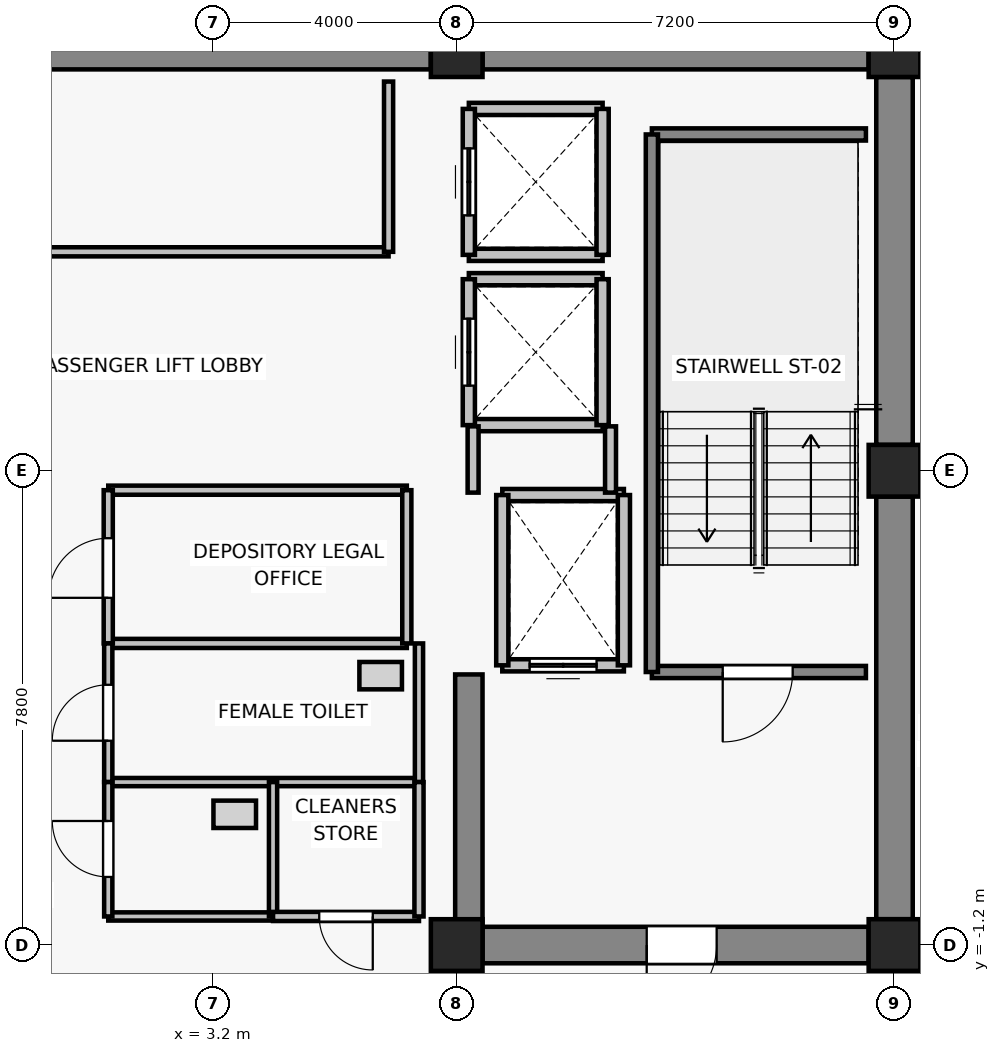
"""IFC4 building model, lengths in metres.
Left out: names, types, materials, properties, quantities, classifications, styles, units other than length and angle.
Written with IfcOpenShell. Run it as: python <this file> out.ifc"""

import sys

from ifc_helpers import new_model, si_unit, direction, frame, frame_2d, origin, origin_2d, place, context, subcontext, project, spatial, rectangle, extrude, source, transform, mapped, element, fill, save


model = new_model("IFC4")
c1 = context("Model", 3, precision=1e-05, world=origin(), true_north=direction((0.0, 1.0)))
c2 = subcontext(c1, "Body", "Model", "MODEL_VIEW")
j1 = project(units=[si_unit("LENGTHUNIT", "METRE"), si_unit("PLANEANGLEUNIT", "RADIAN")], contexts=[c1])
p1 = place(None, origin())
s1 = spatial("IfcSite", under=j1, at=p1, CompositionType="ELEMENT")
p2 = place(p1, origin())
s2 = spatial("IfcBuilding", under=s1, at=p2, CompositionType="ELEMENT")
p3 = place(p2, frame((0.0, 0.0, 205.6)))
s3 = spatial("IfcBuildingStorey", under=s2, at=p3, CompositionType="ELEMENT", Elevation=205.6)
for number, where, z_axis, x_axis in (
    (1, (7.2, -1.2, 0.0), (0.0, 0.0, 1.0), (1.0, 0.0, 0.0)),
    (2, (14.4, -1.2, 0.0), (0.0, 0.0, 1.0), (1.0, 0.0, 0.0)),
    (3, (14.4, 6.6, 0.0), (0.0, 0.0, 1.0), (1.0, 0.0, 0.0)),
    (4, (7.2, 13.5, 0.0), (0.0, 0.0, 1.0), (1.0, 0.0, 0.0)),
    (5, (14.4, 13.5, 0.0), (0.0, 0.0, 1.0), (1.0, 0.0, 0.0)),
):
    element("IfcColumn", number, at=place(p3, frame(where, z_axis=z_axis, x_axis=x_axis)), inside=s3, PredefinedType="COLUMN", context=c2, shape_type="SweptSolid", body=[
        extrude(rectangle(XDim=0.85, YDim=0.85, at=origin_2d()), origin(), (0.0, 0.0, 1.0), 3.3),
    ])
p4 = place(p3, frame((-6.775, 13.5, 0.0), z_axis=(0.0, 0.0, 1.0), x_axis=(1.0, 0.0, 0.0)))
e6 = element("IfcWall", 6, at=p4, inside=s3, PredefinedType="SHEAR", context=c2, shape_type="SweptSolid", body=[
    extrude(rectangle(XDim=13.55, YDim=0.6, at=frame_2d((6.775, 0.0))), origin(), (0.0, 0.0, 1.0), 3.075),
])
p5 = place(p3, frame((7.625, 13.5, 0.0), z_axis=(0.0, 0.0, 1.0), x_axis=(1.0, 0.0, 0.0)))
e7 = element("IfcWall", 7, at=p5, inside=s3, PredefinedType="SHEAR", context=c2, shape_type="SweptSolid", body=[
    extrude(rectangle(XDim=6.35, YDim=0.6, at=frame_2d((3.175, 0.0))), origin(), (0.0, 0.0, 1.0), 3.075),
])
p6 = place(p3, frame((14.4, -0.775, 0.0), z_axis=(0.0, 0.0, 1.0), x_axis=(0.0, 1.0, 0.0)))
e8 = element("IfcWall", 8, at=p6, inside=s3, PredefinedType="SHEAR", context=c2, shape_type="SweptSolid", body=[
    extrude(rectangle(XDim=6.95, YDim=0.6, at=frame_2d((3.475, 0.0))), origin(), (0.0, 0.0, 1.0), 3.075),
])
p7 = place(p3, frame((14.4, 7.025, 0.0), z_axis=(0.0, 0.0, 1.0), x_axis=(0.0, 1.0, 0.0)))
e9 = element("IfcWall", 9, at=p7, inside=s3, PredefinedType="SHEAR", context=c2, shape_type="SweptSolid", body=[
    extrude(rectangle(XDim=6.05, YDim=0.6, at=frame_2d((3.025, 0.0))), origin(), (0.0, 0.0, 1.0), 3.075),
])
p8 = place(p3, frame((13.975, -1.2, 0.0), z_axis=(0.0, 0.0, 1.0), x_axis=(-1.0, 0.0, 0.0)))
e10 = element("IfcWall", 10, at=p8, inside=s3, PredefinedType="SHEAR", context=c2, shape_type="SweptSolid", body=[
    extrude(rectangle(XDim=6.35, YDim=0.6, at=frame_2d((3.175, 0.0))), origin(), (0.0, 0.0, 1.0), 3.075),
])
p9 = place(p8, frame((2.5, 0.0, 0.0)))
e11 = element("IfcOpeningElement", 11, at=p9, cuts=e10, PredefinedType="OPENING", context=c2, shape_type="SweptSolid", body=[
    extrude(rectangle(XDim=1.15, YDim=2.15, at=frame_2d((0.575, 1.075))), frame((0.0, 0.31, 0.0), z_axis=(0.0, -1.0, 0.0), x_axis=(1.0, 0.0, 0.0)), (0.0, 0.0, 1.0), 0.62),
])
p10 = place(p3, frame((7.4, -0.9, 0.0), z_axis=(0.0, 0.0, 1.0), x_axis=(0.0, 1.0, 0.0)))
e12 = element("IfcWall", 12, at=p10, inside=s3, PredefinedType="SHEAR", context=c2, shape_type="SweptSolid", body=[
    extrude(rectangle(XDim=4.15, YDim=0.45, at=frame_2d((2.075, 0.0))), origin(), (0.0, 0.0, 1.0), 3.075),
])
p11 = place(p3, frame((9.95, 3.4, 0.0), z_axis=(0.0, 0.0, 1.0), x_axis=(-1.0, 0.0, 0.0)))
e13 = element("IfcWall", 13, at=p11, inside=s3, PredefinedType="SOLIDWALL", context=c2, shape_type="SweptSolid", body=[
    extrude(rectangle(XDim=2.0, YDim=0.2, at=frame_2d((1.0, 0.0))), origin(), (0.0, 0.0, 1.0), 3.075),
])
p12 = place(p11, frame((0.45, 0.0, 0.0)))
e14 = element("IfcOpeningElement", 14, at=p12, cuts=e13, PredefinedType="OPENING", context=c2, shape_type="SweptSolid", body=[
    extrude(rectangle(XDim=1.1, YDim=2.2, at=frame_2d((0.55, 1.1))), frame((0.0, 0.11, 0.0), z_axis=(0.0, -1.0, 0.0), x_axis=(1.0, 0.0, 0.0)), (0.0, 0.0, 1.0), 0.22),
])
p13 = place(p3, frame((7.95, 6.2, 0.0), z_axis=(0.0, 0.0, 1.0), x_axis=(1.0, 0.0, 0.0)))
e15 = element("IfcWall", 15, at=p13, inside=s3, PredefinedType="SOLIDWALL", context=c2, shape_type="SweptSolid", body=[
    extrude(rectangle(XDim=2.0, YDim=0.2, at=frame_2d((1.0, 0.0))), origin(), (0.0, 0.0, 1.0), 3.075),
])
for number, where, z_axis, x_axis in (
    (16, (7.95, 3.4, 0.0), (0.0, 0.0, 1.0), (0.0, 1.0, 0.0)),
    (17, (9.95, 6.2, 0.0), (0.0, 0.0, 1.0), (0.0, -1.0, 0.0)),
):
    element("IfcWall", number, at=place(p3, frame(where, z_axis=z_axis, x_axis=x_axis)), inside=s3, PredefinedType="SOLIDWALL", context=c2, shape_type="SweptSolid", body=[
        extrude(rectangle(XDim=2.8, YDim=0.2, at=frame_2d((1.4, 0.0))), origin(), (0.0, 0.0, 1.0), 3.075),
    ])
for number, where, z_axis, x_axis in (
    (18, (9.6, 7.35, 0.0), (0.0, 0.0, 1.0), (-1.0, 0.0, 0.0)),
    (19, (7.4, 9.75, 0.0), (0.0, 0.0, 1.0), (1.0, 0.0, 0.0)),
):
    element("IfcWall", number, at=place(p3, frame(where, z_axis=z_axis, x_axis=x_axis)), inside=s3, PredefinedType="SOLIDWALL", context=c2, shape_type="SweptSolid", body=[
        extrude(rectangle(XDim=2.2, YDim=0.2, at=frame_2d((1.1, 0.0))), origin(), (0.0, 0.0, 1.0), 2.615),
    ])
p14 = place(p3, frame((7.4, 7.35, 0.0), z_axis=(0.0, 0.0, 1.0), x_axis=(0.0, 1.0, 0.0)))
e20 = element("IfcWall", 20, at=p14, inside=s3, PredefinedType="SOLIDWALL", context=c2, shape_type="SweptSolid", body=[
    extrude(rectangle(XDim=2.4, YDim=0.2, at=frame_2d((1.2, 0.0))), origin(), (0.0, 0.0, 1.0), 2.615),
])
p15 = place(p14, frame((0.65, 0.0, 0.0)))
e21 = element("IfcOpeningElement", 21, at=p15, cuts=e20, PredefinedType="OPENING", context=c2, shape_type="SweptSolid", body=[
    extrude(rectangle(XDim=1.1, YDim=2.2, at=frame_2d((0.55, 1.1))), frame((0.0, 0.11, 0.0), z_axis=(0.0, -1.0, 0.0), x_axis=(1.0, 0.0, 0.0)), (0.0, 0.0, 1.0), 0.22),
])
p16 = place(p3, frame((9.6, 9.75, 0.0), z_axis=(0.0, 0.0, 1.0), x_axis=(0.0, -1.0, 0.0)))
e22 = element("IfcWall", 22, at=p16, inside=s3, PredefinedType="SOLIDWALL", context=c2, shape_type="SweptSolid", body=[
    extrude(rectangle(XDim=2.4, YDim=0.2, at=frame_2d((1.2, 0.0))), origin(), (0.0, 0.0, 1.0), 3.075),
])
for number, where, z_axis, x_axis in (
    (23, (9.6, 10.15, 0.0), (0.0, 0.0, 1.0), (-1.0, 0.0, 0.0)),
    (24, (7.4, 12.55, 0.0), (0.0, 0.0, 1.0), (1.0, 0.0, 0.0)),
):
    element("IfcWall", number, at=place(p3, frame(where, z_axis=z_axis, x_axis=x_axis)), inside=s3, PredefinedType="SOLIDWALL", context=c2, shape_type="SweptSolid", body=[
        extrude(rectangle(XDim=2.2, YDim=0.2, at=frame_2d((1.1, 0.0))), origin(), (0.0, 0.0, 1.0), 2.615),
    ])
p17 = place(p3, frame((7.4, 10.15, 0.0), z_axis=(0.0, 0.0, 1.0), x_axis=(0.0, 1.0, 0.0)))
e25 = element("IfcWall", 25, at=p17, inside=s3, PredefinedType="SOLIDWALL", context=c2, shape_type="SweptSolid", body=[
    extrude(rectangle(XDim=2.4, YDim=0.2, at=frame_2d((1.2, 0.0))), origin(), (0.0, 0.0, 1.0), 2.615),
])
p18 = place(p17, frame((0.65, 0.0, 0.0)))
e26 = element("IfcOpeningElement", 26, at=p18, cuts=e25, PredefinedType="OPENING", context=c2, shape_type="SweptSolid", body=[
    extrude(rectangle(XDim=1.1, YDim=2.2, at=frame_2d((0.55, 1.1))), frame((0.0, 0.11, 0.0), z_axis=(0.0, -1.0, 0.0), x_axis=(1.0, 0.0, 0.0)), (0.0, 0.0, 1.0), 0.22),
])
p19 = place(p3, frame((9.6, 12.55, 0.0), z_axis=(0.0, 0.0, 1.0), x_axis=(0.0, -1.0, 0.0)))
e27 = element("IfcWall", 27, at=p19, inside=s3, PredefinedType="SOLIDWALL", context=c2, shape_type="SweptSolid", body=[
    extrude(rectangle(XDim=2.4, YDim=0.2, at=frame_2d((1.2, 0.0))), origin(), (0.0, 0.0, 1.0), 3.075),
])
p20 = place(p3, frame((13.93, 3.29, 0.0), z_axis=(0.0, 0.0, 1.0), x_axis=(-1.0, 0.0, 0.0)))
e28 = element("IfcWall", 28, at=p20, inside=s3, PredefinedType="SOLIDWALL", context=c2, shape_type="SweptSolid", body=[
    extrude(rectangle(XDim=3.52, YDim=0.2, at=frame_2d((1.76, 0.0))), origin(), (0.0, 0.0, 1.0), 3.075),
])
p21 = place(p20, frame((1.205, 0.0, 0.0)))
e29 = element("IfcOpeningElement", 29, at=p21, cuts=e28, PredefinedType="OPENING", context=c2, shape_type="SweptSolid", body=[
    extrude(rectangle(XDim=1.15, YDim=2.15, at=frame_2d((0.575, 1.075))), frame((0.0, 0.11, 0.0), z_axis=(0.0, -1.0, 0.0), x_axis=(1.0, 0.0, 0.0)), (0.0, 0.0, 1.0), 0.22),
])
p22 = place(p3, frame((10.41, 12.13, 0.0), z_axis=(0.0, 0.0, 1.0), x_axis=(1.0, 0.0, 0.0)))
e30 = element("IfcWall", 30, at=p22, inside=s3, PredefinedType="SOLIDWALL", context=c2, shape_type="SweptSolid", body=[
    extrude(rectangle(XDim=3.52, YDim=0.2, at=frame_2d((1.76, 0.0))), origin(), (0.0, 0.0, 1.0), 3.075),
])
p23 = place(p3, frame((10.41, 3.29, 0.0), z_axis=(0.0, 0.0, 1.0), x_axis=(0.0, 1.0, 0.0)))
e31 = element("IfcWall", 31, at=p23, inside=s3, PredefinedType="SOLIDWALL", context=c2, shape_type="SweptSolid", body=[
    extrude(rectangle(XDim=8.84, YDim=0.2, at=frame_2d((4.42, 0.0))), origin(), (0.0, 0.0, 1.0), 3.075),
])
p24 = place(p3, frame((7.47, 6.24, 0.0), z_axis=(0.0, 0.0, 1.0), x_axis=(0.0, 1.0, 0.0)))
e32 = element("IfcWall", 32, at=p24, inside=s3, PredefinedType="PARTITIONING", context=c2, shape_type="SweptSolid", body=[
    extrude(rectangle(XDim=1.09, YDim=0.18, at=frame_2d((0.545, 0.0))), origin(), (0.0, 0.0, 1.0), 2.615),
])
p25 = place(p3, frame((9.73, 7.33, 0.0), z_axis=(0.0, 0.0, 1.0), x_axis=(0.0, -1.0, 0.0)))
e33 = element("IfcWall", 33, at=p25, inside=s3, PredefinedType="PARTITIONING", context=c2, shape_type="SweptSolid", body=[
    extrude(rectangle(XDim=1.09, YDim=0.18, at=frame_2d((0.545, 0.0))), origin(), (0.0, 0.0, 1.0), 3.075),
])
p26 = place(p3, frame((6.08, 10.2, 0.0), z_axis=(0.0, 0.0, 1.0), x_axis=(-1.0, 0.0, 0.0)))
e34 = element("IfcWall", 34, at=p26, inside=s3, PredefinedType="PARTITIONING", context=c2, shape_type="SweptSolid", body=[
    extrude(rectangle(XDim=12.16, YDim=0.15, at=frame_2d((6.08, 0.0))), origin(), (0.0, 0.0, 1.0), 2.59),
])
p27 = place(p26, frame((7.005, 0.0, 0.0)))
e35 = element("IfcOpeningElement", 35, at=p27, cuts=e34, PredefinedType="OPENING", context=c2, shape_type="SweptSolid", body=[
    extrude(rectangle(XDim=1.15, YDim=2.15, at=frame_2d((0.575, 1.075))), frame((0.0, 0.085, 0.0), z_axis=(0.0, -1.0, 0.0), x_axis=(1.0, 0.0, 0.0)), (0.0, 0.0, 1.0), 0.17),
])
p28 = place(p3, frame((6.08, 13.0, 0.0), z_axis=(0.0, 0.0, 1.0), x_axis=(0.0, -1.0, 0.0)))
e36 = element("IfcWall", 36, at=p28, inside=s3, PredefinedType="PARTITIONING", context=c2, shape_type="SweptSolid", body=[
    extrude(rectangle(XDim=2.8, YDim=0.15, at=frame_2d((1.4, 0.0))), origin(), (0.0, 0.0, 1.0), 3.075),
])
for number, where, z_axis, x_axis in (
    (37, (6.38, 3.76, 0.0), (0.0, 0.0, 1.0), (-1.0, 0.0, 0.0)),
    (38, (1.47, 6.28, 0.0), (0.0, 0.0, 1.0), (1.0, 0.0, 0.0)),
):
    element("IfcWall", number, at=place(p3, frame(where, z_axis=z_axis, x_axis=x_axis)), inside=s3, PredefinedType="PARTITIONING", context=c2, shape_type="SweptSolid", body=[
        extrude(rectangle(XDim=4.91, YDim=0.15, at=frame_2d((2.455, 0.0))), origin(), (0.0, 0.0, 1.0), 3.075),
    ])
p29 = place(p3, frame((1.47, 3.76, 0.0), z_axis=(0.0, 0.0, 1.0), x_axis=(0.0, 1.0, 0.0)))
e39 = element("IfcWall", 39, at=p29, inside=s3, PredefinedType="PARTITIONING", context=c2, shape_type="SweptSolid", body=[
    extrude(rectangle(XDim=2.52, YDim=0.15, at=frame_2d((1.26, 0.0))), origin(), (0.0, 0.0, 1.0), 3.075),
])
p30 = place(p29, frame((0.75, 0.0, 0.0)))
e40 = element("IfcOpeningElement", 40, at=p30, cuts=e39, PredefinedType="OPENING", context=c2, shape_type="SweptSolid", body=[
    extrude(rectangle(XDim=0.98, YDim=2.15, at=frame_2d((0.49, 1.075))), frame((0.0, 0.085, 0.0), z_axis=(0.0, -1.0, 0.0), x_axis=(1.0, 0.0, 0.0)), (0.0, 0.0, 1.0), 0.17),
])
p31 = place(p3, frame((6.38, 6.28, 0.0), z_axis=(0.0, 0.0, 1.0), x_axis=(0.0, -1.0, 0.0)))
e41 = element("IfcWall", 41, at=p31, inside=s3, PredefinedType="PARTITIONING", context=c2, shape_type="SweptSolid", body=[
    extrude(rectangle(XDim=2.52, YDim=0.15, at=frame_2d((1.26, 0.0))), origin(), (0.0, 0.0, 1.0), 3.075),
])
p32 = place(p3, frame((6.58, 1.48, 0.0), z_axis=(0.0, 0.0, 1.0), x_axis=(-1.0, 0.0, 0.0)))
e42 = element("IfcWall", 42, at=p32, inside=s3, PredefinedType="PARTITIONING", context=c2, shape_type="SweptSolid", body=[
    extrude(rectangle(XDim=5.11, YDim=0.135, at=frame_2d((2.555, 0.0))), origin(), (0.0, 0.0, 1.0), 3.075),
])
p33 = place(p3, frame((1.47, 1.48, 0.0), z_axis=(0.0, 0.0, 1.0), x_axis=(0.0, 1.0, 0.0)))
e43 = element("IfcWall", 43, at=p33, inside=s3, PredefinedType="PARTITIONING", context=c2, shape_type="SweptSolid", body=[
    extrude(rectangle(XDim=2.28, YDim=0.135, at=frame_2d((1.14, 0.0))), origin(), (0.0, 0.0, 1.0), 3.075),
])
p34 = place(p33, frame((0.68, 0.0, 0.0)))
e44 = element("IfcOpeningElement", 44, at=p34, cuts=e43, PredefinedType="OPENING", context=c2, shape_type="SweptSolid", body=[
    extrude(rectangle(XDim=0.92, YDim=2.1, at=frame_2d((0.46, 1.05))), frame((0.0, 0.077, 0.0), z_axis=(0.0, -1.0, 0.0), x_axis=(1.0, 0.0, 0.0)), (0.0, 0.0, 1.0), 0.155),
])
p35 = place(p3, frame((6.58, 3.76, 0.0), z_axis=(0.0, 0.0, 1.0), x_axis=(0.0, -1.0, 0.0)))
e45 = element("IfcWall", 45, at=p35, inside=s3, PredefinedType="PARTITIONING", context=c2, shape_type="SweptSolid", body=[
    extrude(rectangle(XDim=2.28, YDim=0.135, at=frame_2d((1.14, 0.0))), origin(), (0.0, 0.0, 1.0), 3.075),
])
p36 = place(p3, frame((4.18, -0.73, 0.0), z_axis=(0.0, 0.0, 1.0), x_axis=(-1.0, 0.0, 0.0)))
e46 = element("IfcWall", 46, at=p36, inside=s3, PredefinedType="PARTITIONING", context=c2, shape_type="SweptSolid", body=[
    extrude(rectangle(XDim=2.71, YDim=0.135, at=frame_2d((1.355, 0.0))), origin(), (0.0, 0.0, 1.0), 3.075),
])
p37 = place(p3, frame((1.47, -0.73, 0.0), z_axis=(0.0, 0.0, 1.0), x_axis=(0.0, 1.0, 0.0)))
e47 = element("IfcWall", 47, at=p37, inside=s3, PredefinedType="PARTITIONING", context=c2, shape_type="SweptSolid", body=[
    extrude(rectangle(XDim=2.21, YDim=0.135, at=frame_2d((1.105, 0.0))), origin(), (0.0, 0.0, 1.0), 3.075),
])
p38 = place(p37, frame((0.65, 0.0, 0.0)))
e48 = element("IfcOpeningElement", 48, at=p38, cuts=e47, PredefinedType="OPENING", context=c2, shape_type="SweptSolid", body=[
    extrude(rectangle(XDim=0.92, YDim=2.1, at=frame_2d((0.46, 1.05))), frame((0.0, 0.077, 0.0), z_axis=(0.0, -1.0, 0.0), x_axis=(1.0, 0.0, 0.0)), (0.0, 0.0, 1.0), 0.155),
])
p39 = place(p3, frame((4.18, 1.48, 0.0), z_axis=(0.0, 0.0, 1.0), x_axis=(0.0, -1.0, 0.0)))
e49 = element("IfcWall", 49, at=p39, inside=s3, PredefinedType="PARTITIONING", context=c2, shape_type="SweptSolid", body=[
    extrude(rectangle(XDim=2.21, YDim=0.135, at=frame_2d((1.105, 0.0))), origin(), (0.0, 0.0, 1.0), 3.075),
])
p40 = place(p3, frame((6.58, -0.73, 0.0), z_axis=(0.0, 0.0, 1.0), x_axis=(-1.0, 0.0, 0.0)))
e50 = element("IfcWall", 50, at=p40, inside=s3, PredefinedType="PARTITIONING", context=c2, shape_type="SweptSolid", body=[
    extrude(rectangle(XDim=2.4, YDim=0.15, at=frame_2d((1.2, 0.0))), origin(), (0.0, 0.0, 1.0), 3.075),
])
p41 = place(p40, frame((0.76, 0.0, 0.0)))
e51 = element("IfcOpeningElement", 51, at=p41, cuts=e50, PredefinedType="OPENING", context=c2, shape_type="SweptSolid", body=[
    extrude(rectangle(XDim=0.88, YDim=2.1, at=frame_2d((0.44, 1.05))), frame((0.0, 0.085, 0.0), z_axis=(0.0, -1.0, 0.0), x_axis=(1.0, 0.0, 0.0)), (0.0, 0.0, 1.0), 0.17),
])
p42 = place(p3, frame((6.58, 1.48, 0.0), z_axis=(0.0, 0.0, 1.0), x_axis=(0.0, -1.0, 0.0)))
e52 = element("IfcWall", 52, at=p42, inside=s3, PredefinedType="PARTITIONING", context=c2, shape_type="SweptSolid", body=[
    extrude(rectangle(XDim=2.21, YDim=0.15, at=frame_2d((1.105, 0.0))), origin(), (0.0, 0.0, 1.0), 3.075),
])
m1 = source(origin(), c2, "Body", "SweptSolid", [
    extrude(rectangle(XDim=1.1, YDim=2.2, at=frame_2d((0.55, 1.1))), frame((0.0, 0.025, 0.0), z_axis=(0.0, -1.0, 0.0), x_axis=(1.0, 0.0, 0.0)), (0.0, 0.0, 1.0), 0.05),
])
p43 = place(p12, origin())
e53 = element("IfcDoor", 53, at=p43, inside=s3, OperationType="DOUBLE_DOOR_SLIDING", PredefinedType="DOOR", context=c2, shape_type="MappedRepresentation", body=[
    mapped(m1, transform((0.0, 0.0, 0.0), x_axis=(1.0, 0.0, 0.0), y_axis=(0.0, 1.0, 0.0), z_axis=(0.0, 0.0, 1.0), scale=1.0)),
])
fill(e14, e53)
p44 = place(p15, origin())
e54 = element("IfcDoor", 54, at=p44, inside=s3, OperationType="DOUBLE_DOOR_SLIDING", PredefinedType="DOOR", context=c2, shape_type="MappedRepresentation", body=[
    mapped(m1, transform((0.0, 0.0, 0.0), x_axis=(1.0, 0.0, 0.0), y_axis=(0.0, 1.0, 0.0), z_axis=(0.0, 0.0, 1.0), scale=1.0)),
])
fill(e21, e54)
p45 = place(p18, origin())
e55 = element("IfcDoor", 55, at=p45, inside=s3, OperationType="DOUBLE_DOOR_SLIDING", PredefinedType="DOOR", context=c2, shape_type="MappedRepresentation", body=[
    mapped(m1, transform((0.0, 0.0, 0.0), x_axis=(1.0, 0.0, 0.0), y_axis=(0.0, 1.0, 0.0), z_axis=(0.0, 0.0, 1.0), scale=1.0)),
])
fill(e26, e55)
m2 = source(origin(), c2, "Body", "SweptSolid", [
    extrude(rectangle(XDim=1.15, YDim=2.15, at=frame_2d((0.575, 1.075))), frame((0.0, 0.025, 0.0), z_axis=(0.0, -1.0, 0.0), x_axis=(1.0, 0.0, 0.0)), (0.0, 0.0, 1.0), 0.05),
])
p46 = place(p21, origin())
e56 = element("IfcDoor", 56, at=p46, inside=s3, OperationType="SINGLE_SWING_RIGHT", PredefinedType="DOOR", context=c2, shape_type="MappedRepresentation", body=[
    mapped(m2, transform((0.0, 0.0, 0.0), x_axis=(1.0, 0.0, 0.0), y_axis=(0.0, 1.0, 0.0), z_axis=(0.0, 0.0, 1.0), scale=1.0)),
])
fill(e29, e56)
p47 = place(p9, origin())
e57 = element("IfcDoor", 57, at=p47, inside=s3, OperationType="SINGLE_SWING_RIGHT", PredefinedType="DOOR", context=c2, shape_type="MappedRepresentation", body=[
    mapped(m2, transform((0.0, 0.0, 0.0), x_axis=(1.0, 0.0, 0.0), y_axis=(0.0, 1.0, 0.0), z_axis=(0.0, 0.0, 1.0), scale=1.0)),
])
fill(e11, e57)
m3 = source(origin(), c2, "Body", "SweptSolid", [
    extrude(rectangle(XDim=0.98, YDim=2.15, at=frame_2d((0.49, 1.075))), frame((0.0, 0.025, 0.0), z_axis=(0.0, -1.0, 0.0), x_axis=(1.0, 0.0, 0.0)), (0.0, 0.0, 1.0), 0.05),
])
p48 = place(p30, origin())
e58 = element("IfcDoor", 58, at=p48, inside=s3, OperationType="SINGLE_SWING_LEFT", PredefinedType="DOOR", context=c2, shape_type="MappedRepresentation", body=[
    mapped(m3, transform((0.0, 0.0, 0.0), x_axis=(1.0, 0.0, 0.0), y_axis=(0.0, 1.0, 0.0), z_axis=(0.0, 0.0, 1.0), scale=1.0)),
])
fill(e40, e58)
m4 = source(origin(), c2, "Body", "SweptSolid", [
    extrude(rectangle(XDim=0.92, YDim=2.1, at=frame_2d((0.46, 1.05))), frame((0.0, 0.025, 0.0), z_axis=(0.0, -1.0, 0.0), x_axis=(1.0, 0.0, 0.0)), (0.0, 0.0, 1.0), 0.05),
])
p49 = place(p34, origin())
e59 = element("IfcDoor", 59, at=p49, inside=s3, OperationType="SINGLE_SWING_LEFT", PredefinedType="DOOR", context=c2, shape_type="MappedRepresentation", body=[
    mapped(m4, transform((0.0, 0.0, 0.0), x_axis=(1.0, 0.0, 0.0), y_axis=(0.0, 1.0, 0.0), z_axis=(0.0, 0.0, 1.0), scale=1.0)),
])
fill(e44, e59)
p50 = place(p38, origin())
e60 = element("IfcDoor", 60, at=p50, inside=s3, OperationType="SINGLE_SWING_RIGHT", PredefinedType="DOOR", context=c2, shape_type="MappedRepresentation", body=[
    mapped(m4, transform((0.0, 0.0, 0.0), x_axis=(1.0, 0.0, 0.0), y_axis=(0.0, 1.0, 0.0), z_axis=(0.0, 0.0, 1.0), scale=1.0)),
])
fill(e48, e60)
m5 = source(origin(), c2, "Body", "SweptSolid", [
    extrude(rectangle(XDim=0.88, YDim=2.1, at=frame_2d((0.44, 1.05))), frame((0.0, 0.025, 0.0), z_axis=(0.0, -1.0, 0.0), x_axis=(1.0, 0.0, 0.0)), (0.0, 0.0, 1.0), 0.05),
])
p51 = place(p41, origin())
e61 = element("IfcDoor", 61, at=p51, inside=s3, OperationType="SINGLE_SWING_LEFT", PredefinedType="DOOR", context=c2, shape_type="MappedRepresentation", body=[
    mapped(m5, transform((0.0, 0.0, 0.0), x_axis=(1.0, 0.0, 0.0), y_axis=(0.0, 1.0, 0.0), z_axis=(0.0, 0.0, 1.0), scale=1.0)),
])
fill(e51, e61)
save(model, sys.argv[1])
